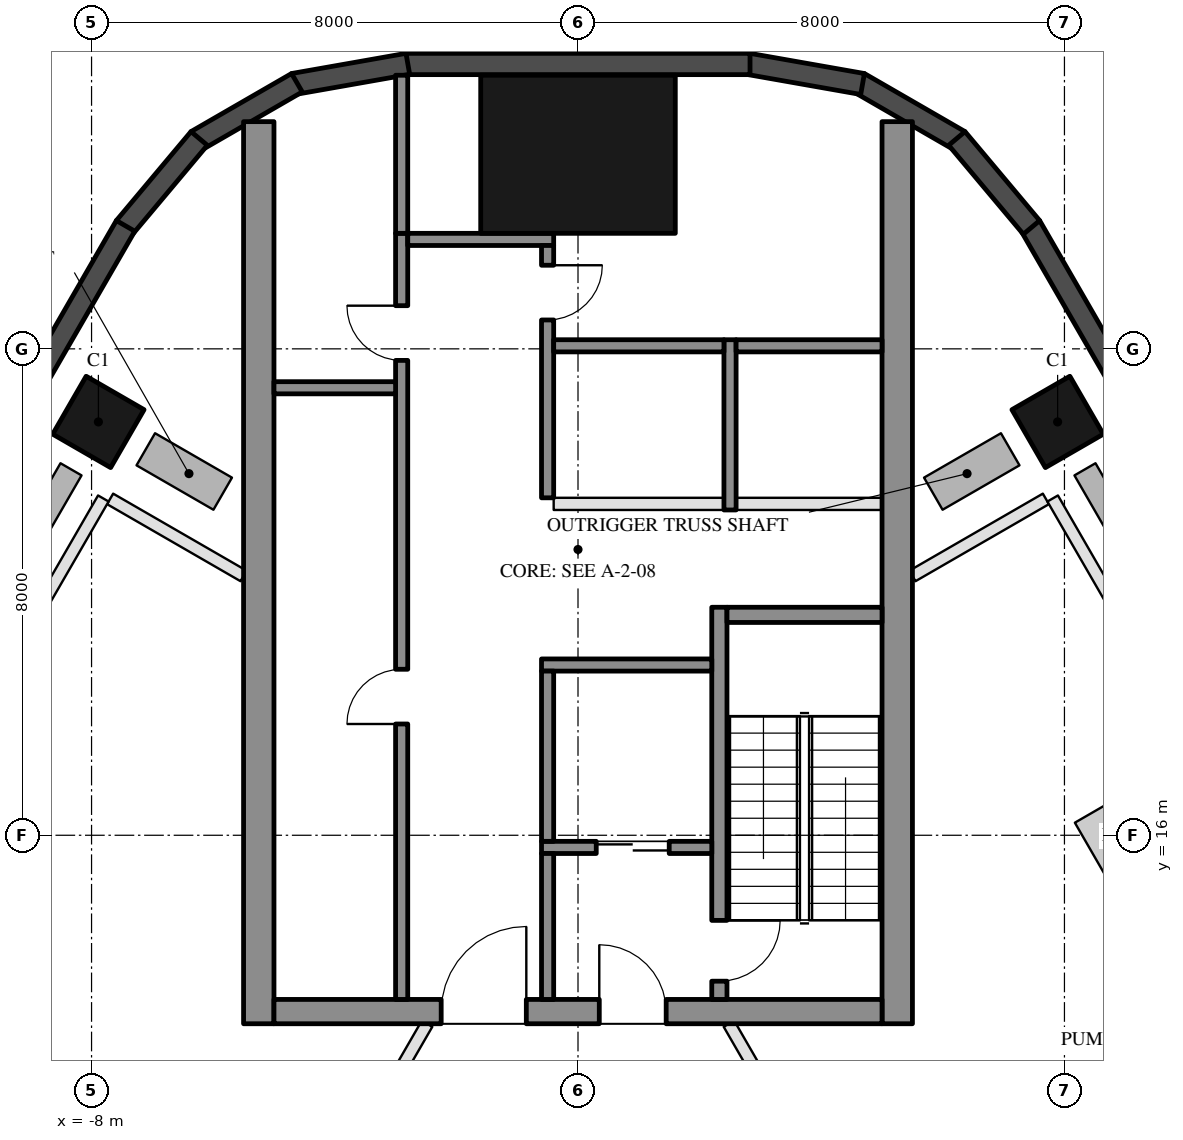
"""IFC4 building model, lengths in metres.
Left out: names, types, materials, properties, quantities, classifications, styles, units other than length and angle.
Written with IfcOpenShell. Run it as: python <this file> out.ifc"""

import sys

from ifc_helpers import new_model, si_unit, direction, frame, frame_2d, origin, origin_2d, place, context, subcontext, project, spatial, rectangle, hollow_rectangle, extrude, element, fill, save


model = new_model("IFC4")
c1 = context("Model", 3, precision=1e-05, world=origin(), true_north=direction((0.0, 1.0)))
c2 = subcontext(c1, "Body", "Model", "MODEL_VIEW")
j1 = project(units=[si_unit("LENGTHUNIT", "METRE"), si_unit("PLANEANGLEUNIT", "RADIAN")], contexts=[c1])
p1 = place(None, origin())
s1 = spatial("IfcSite", under=j1, at=p1, CompositionType="ELEMENT")
p2 = place(p1, origin())
s2 = spatial("IfcBuilding", under=s1, at=p2, CompositionType="ELEMENT")
p3 = place(p2, frame((0.0, 0.0, 42.0)))
s3 = spatial("IfcBuildingStorey", under=s2, at=p3, CompositionType="ELEMENT", Elevation=42.0)
for number, where, z_axis, x_axis in (
    (1, (7.888, 22.798, 0.0), (0.0, 0.0, 1.0), (-0.5, 0.866, 0.0)),
    (2, (-7.888, 22.798, 0.0), (0.0, 0.0, 1.0), (0.5, 0.866, 0.0)),
):
    element("IfcColumn", number, at=place(p3, frame(where, z_axis=z_axis, x_axis=x_axis)), inside=s3, PredefinedType="COLUMN", context=c2, shape_type="SweptSolid", body=[
        extrude(hollow_rectangle(XDim=1.1, YDim=1.1, WallThickness=0.05, at=origin_2d()), origin(), (0.0, 0.0, 1.0), 4.5),
    ])
p4 = place(p3, frame((0.0, 27.2, 0.0), z_axis=(0.0, 0.0, 1.0), x_axis=(1.0, 0.0, 0.0)))
e3 = element("IfcColumn", 3, at=p4, inside=s3, PredefinedType="COLUMN", context=c2, shape_type="SweptSolid", body=[
    extrude(hollow_rectangle(XDim=3.2, YDim=2.6, WallThickness=0.08, at=origin_2d()), origin(), (0.0, 0.0, 1.0), 4.5),
])
for number, where, z_axis, x_axis in (
    (4, (6.277, 27.422, 0.0), (0.0, 0.0, 1.0), (-0.866, 0.5, 0.0)),
    (5, (4.68, 28.356, 0.0), (0.0, 0.0, 1.0), (-0.985, 0.174, 0.0)),
):
    element("IfcWall", number, at=place(p3, frame(where, z_axis=z_axis, x_axis=x_axis)), inside=s3, PredefinedType="SOLIDWALL", context=c2, shape_type="SweptSolid", body=[
        extrude(rectangle(XDim=1.91, YDim=0.35, at=frame_2d((0.955, 0.0))), origin(), (0.0, 0.0, 1.0), 4.35),
    ])
p5 = place(p3, frame((2.829, 28.685, 0.0), z_axis=(0.0, 0.0, 1.0), x_axis=(-1.0, 0.0, 0.0)))
e6 = element("IfcWall", 6, at=p5, inside=s3, PredefinedType="SOLIDWALL", context=c2, shape_type="SweptSolid", body=[
    extrude(rectangle(XDim=5.658, YDim=0.35, at=frame_2d((2.829, 0.0))), origin(), (0.0, 0.0, 1.0), 4.35),
])
for number, where, z_axis, x_axis in (
    (7, (-2.799, 28.688, 0.0), (0.0, 0.0, 1.0), (-0.985, -0.174, 0.0)),
    (8, (-4.623, 28.377, 0.0), (0.0, 0.0, 1.0), (-0.866, -0.5, 0.0)),
):
    element("IfcWall", number, at=place(p3, frame(where, z_axis=z_axis, x_axis=x_axis)), inside=s3, PredefinedType="SOLIDWALL", context=c2, shape_type="SweptSolid", body=[
        extrude(rectangle(XDim=1.91, YDim=0.35, at=frame_2d((0.955, 0.0))), origin(), (0.0, 0.0, 1.0), 4.35),
    ])
p6 = place(p3, frame((-6.23, 27.461, 0.0), z_axis=(0.0, 0.0, 1.0), x_axis=(-0.642808304945, -0.766027077259, 0.0)))
e9 = element("IfcWall", 9, at=p6, inside=s3, PredefinedType="SOLIDWALL", context=c2, shape_type="SweptSolid", body=[
    extrude(rectangle(XDim=1.91, YDim=0.35, at=frame_2d((0.955, 0.0))), origin(), (0.0, 0.0, 1.0), 4.35),
])
for number, where, z_axis, x_axis in (
    (10, (-7.441, 26.022, 0.0), (0.0, 0.0, 1.0), (-0.5, -0.866, 0.0)),
    (11, (26.256, -6.567, 0.0), (0.0, 0.0, 1.0), (-0.5, 0.866, 0.0)),
):
    element("IfcWall", number, at=place(p3, frame(where, z_axis=z_axis, x_axis=x_axis)), inside=s3, PredefinedType="SOLIDWALL", context=c2, shape_type="SweptSolid", body=[
        extrude(rectangle(XDim=37.631, YDim=0.35, at=frame_2d((18.816, 0.0))), origin(), (0.0, 0.0, 1.0), 4.35),
    ])
p7 = place(p3, frame((7.458, 25.998, 0.0), z_axis=(0.0, 0.0, 1.0), x_axis=(-0.642808304945, 0.766027077259, 0.0)))
e12 = element("IfcWall", 12, at=p7, inside=s3, PredefinedType="SOLIDWALL", context=c2, shape_type="SweptSolid", body=[
    extrude(rectangle(XDim=1.91, YDim=0.35, at=frame_2d((0.955, 0.0))), origin(), (0.0, 0.0, 1.0), 4.35),
])
for number, where, z_axis, x_axis in (
    (13, (5.25, 12.9, 0.0), (0.0, 0.0, 1.0), (0.0, 1.0, 0.0)),
    (14, (-5.25, 12.9, 0.0), (0.0, 0.0, 1.0), (0.0, 1.0, 0.0)),
):
    element("IfcWall", number, at=place(p3, frame(where, z_axis=z_axis, x_axis=x_axis)), inside=s3, PredefinedType="SHEAR", context=c2, shape_type="SweptSolid", body=[
        extrude(rectangle(XDim=14.837, YDim=0.5, at=frame_2d((7.418, 0.0))), origin(), (0.0, 0.0, 1.0), 4.3),
    ])
p8 = place(p3, frame((5.0, 13.1, 0.0), z_axis=(0.0, 0.0, 1.0), x_axis=(-1.0, 0.0, 0.0)))
e15 = element("IfcWall", 15, at=p8, inside=s3, PredefinedType="SHEAR", context=c2, shape_type="SweptSolid", body=[
    extrude(rectangle(XDim=10.0, YDim=0.4, at=frame_2d((5.0, 0.0))), origin(), (0.0, 0.0, 1.0), 4.3),
])
p9 = place(p8, frame((3.55, 0.0, 0.0)))
e16 = element("IfcOpeningElement", 16, at=p9, cuts=e15, PredefinedType="OPENING", context=c2, shape_type="SweptSolid", body=[
    extrude(rectangle(XDim=1.1, YDim=2.1, at=frame_2d((0.55, 1.05))), frame((0.0, 0.21, 0.0), z_axis=(0.0, -1.0, 0.0), x_axis=(1.0, 0.0, 0.0)), (0.0, 0.0, 1.0), 0.42),
])
p10 = place(p8, frame((5.85, 0.0, 0.0)))
e17 = element("IfcOpeningElement", 17, at=p10, cuts=e15, PredefinedType="OPENING", context=c2, shape_type="SweptSolid", body=[
    extrude(rectangle(XDim=1.4, YDim=2.1, at=frame_2d((0.7, 1.05))), frame((0.0, 0.21, 0.0), z_axis=(0.0, -1.0, 0.0), x_axis=(1.0, 0.0, 0.0)), (0.0, 0.0, 1.0), 0.42),
])
p11 = place(p3, frame((2.325, 13.3, 0.0), z_axis=(0.0, 0.0, 1.0), x_axis=(0.0, 1.0, 0.0)))
e18 = element("IfcWall", 18, at=p11, inside=s3, PredefinedType="SHEAR", context=c2, shape_type="SweptSolid", body=[
    extrude(rectangle(XDim=6.45, YDim=0.25, at=frame_2d((3.225, 0.0))), origin(), (0.0, 0.0, 1.0), 4.3),
])
p12 = place(p11, frame((0.3, 0.0, 0.0)))
e19 = element("IfcOpeningElement", 19, at=p12, cuts=e18, PredefinedType="OPENING", context=c2, shape_type="SweptSolid", body=[
    extrude(rectangle(XDim=1.0, YDim=2.1, at=frame_2d((0.5, 1.05))), frame((0.0, 0.135, 0.0), z_axis=(0.0, -1.0, 0.0), x_axis=(1.0, 0.0, 0.0)), (0.0, 0.0, 1.0), 0.27),
])
p13 = place(p3, frame((5.0, 19.625, 0.0), z_axis=(0.0, 0.0, 1.0), x_axis=(-1.0, 0.0, 0.0)))
e20 = element("IfcWall", 20, at=p13, inside=s3, PredefinedType="SHEAR", context=c2, shape_type="SweptSolid", body=[
    extrude(rectangle(XDim=2.55, YDim=0.25, at=frame_2d((1.275, 0.0))), origin(), (0.0, 0.0, 1.0), 4.3),
])
p14 = place(p3, frame((2.2, 18.8, 0.0), z_axis=(0.0, 0.0, 1.0), x_axis=(-1.0, 0.0, 0.0)))
e21 = element("IfcWall", 21, at=p14, inside=s3, PredefinedType="SHEAR", context=c2, shape_type="SweptSolid", body=[
    extrude(rectangle(XDim=2.8, YDim=0.2, at=frame_2d((1.4, 0.0))), origin(), (0.0, 0.0, 1.0), 4.3),
])
p15 = place(p3, frame((2.2, 15.8, 0.0), z_axis=(0.0, 0.0, 1.0), x_axis=(-1.0, 0.0, 0.0)))
e22 = element("IfcWall", 22, at=p15, inside=s3, PredefinedType="SHEAR", context=c2, shape_type="SweptSolid", body=[
    extrude(rectangle(XDim=2.8, YDim=0.2, at=frame_2d((1.4, 0.0))), origin(), (0.0, 0.0, 1.0), 4.3),
])
p16 = place(p15, frame((0.7, 0.0, 0.0)))
e23 = element("IfcOpeningElement", 23, at=p16, cuts=e22, PredefinedType="OPENING", context=c2, shape_type="SweptSolid", body=[
    extrude(rectangle(XDim=1.2, YDim=2.1, at=frame_2d((0.6, 1.05))), frame((0.0, 0.11, 0.0), z_axis=(0.0, -1.0, 0.0), x_axis=(1.0, 0.0, 0.0)), (0.0, 0.0, 1.0), 0.22),
])
p17 = place(p3, frame((-0.5, 15.9, 0.0), z_axis=(0.0, 0.0, 1.0), x_axis=(0.0, 1.0, 0.0)))
e24 = element("IfcWall", 24, at=p17, inside=s3, PredefinedType="SHEAR", context=c2, shape_type="SweptSolid", body=[
    extrude(rectangle(XDim=2.8, YDim=0.2, at=frame_2d((1.4, 0.0))), origin(), (0.0, 0.0, 1.0), 4.3),
])
p18 = place(p3, frame((-0.5, 13.3, 0.0), z_axis=(0.0, 0.0, 1.0), x_axis=(0.0, 1.0, 0.0)))
e25 = element("IfcWall", 25, at=p18, inside=s3, PredefinedType="SHEAR", context=c2, shape_type="SweptSolid", body=[
    extrude(rectangle(XDim=2.4, YDim=0.2, at=frame_2d((1.2, 0.0))), origin(), (0.0, 0.0, 1.0), 4.3),
])
p19 = place(p3, frame((-2.9, 13.3, 0.0), z_axis=(0.0, 0.0, 1.0), x_axis=(0.0, 1.0, 0.0)))
e26 = element("IfcWall", 26, at=p19, inside=s3, PredefinedType="SHEAR", context=c2, shape_type="SweptSolid", body=[
    extrude(rectangle(XDim=12.6, YDim=0.2, at=frame_2d((6.3, 0.0))), origin(), (0.0, 0.0, 1.0), 4.3),
])
p20 = place(p19, frame((4.53, 0.0, 0.0)))
e27 = element("IfcOpeningElement", 27, at=p20, cuts=e26, PredefinedType="OPENING", context=c2, shape_type="SweptSolid", body=[
    extrude(rectangle(XDim=0.9, YDim=2.1, at=frame_2d((0.45, 1.05))), frame((0.0, 0.11, 0.0), z_axis=(0.0, -1.0, 0.0), x_axis=(1.0, 0.0, 0.0)), (0.0, 0.0, 1.0), 0.22),
])
p21 = place(p19, frame((10.51, 0.0, 0.0)))
e28 = element("IfcOpeningElement", 28, at=p21, cuts=e26, PredefinedType="OPENING", context=c2, shape_type="SweptSolid", body=[
    extrude(rectangle(XDim=0.9, YDim=2.1, at=frame_2d((0.45, 1.05))), frame((0.0, 0.11, 0.0), z_axis=(0.0, -1.0, 0.0), x_axis=(1.0, 0.0, 0.0)), (0.0, 0.0, 1.0), 0.22),
])
p22 = place(p3, frame((-0.4, 25.8, 0.0), z_axis=(0.0, 0.0, 1.0), x_axis=(-1.0, 0.0, 0.0)))
e29 = element("IfcWall", 29, at=p22, inside=s3, PredefinedType="SHEAR", context=c2, shape_type="SweptSolid", body=[
    extrude(rectangle(XDim=2.4, YDim=0.2, at=frame_2d((1.2, 0.0))), origin(), (0.0, 0.0, 1.0), 4.3),
])
p23 = place(p3, frame((-0.5, 21.55, 0.0), z_axis=(0.0, 0.0, 1.0), x_axis=(0.0, 1.0, 0.0)))
e30 = element("IfcWall", 30, at=p23, inside=s3, PredefinedType="SHEAR", context=c2, shape_type="SweptSolid", body=[
    extrude(rectangle(XDim=4.15, YDim=0.2, at=frame_2d((2.075, 0.0))), origin(), (0.0, 0.0, 1.0), 4.3),
])
p24 = place(p23, frame((2.925, 0.0, 0.0)))
e31 = element("IfcOpeningElement", 31, at=p24, cuts=e30, PredefinedType="OPENING", context=c2, shape_type="SweptSolid", body=[
    extrude(rectangle(XDim=0.9, YDim=2.1, at=frame_2d((0.45, 1.05))), frame((0.0, 0.11, 0.0), z_axis=(0.0, -1.0, 0.0), x_axis=(1.0, 0.0, 0.0)), (0.0, 0.0, 1.0), 0.22),
])
p25 = place(p3, frame((-3.0, 23.36, 0.0), z_axis=(0.0, 0.0, 1.0), x_axis=(-1.0, 0.0, 0.0)))
e32 = element("IfcWall", 32, at=p25, inside=s3, PredefinedType="SHEAR", context=c2, shape_type="SweptSolid", body=[
    extrude(rectangle(XDim=2.0, YDim=0.2, at=frame_2d((1.0, 0.0))), origin(), (0.0, 0.0, 1.0), 4.3),
])
p26 = place(p3, frame((-2.9, 25.9, 0.0), z_axis=(0.0, 0.0, 1.0), x_axis=(0.0, 1.0, 0.0)))
e33 = element("IfcWall", 33, at=p26, inside=s3, PredefinedType="SHEAR", context=c2, shape_type="SweptSolid", body=[
    extrude(rectangle(XDim=2.6, YDim=0.2, at=frame_2d((1.3, 0.0))), origin(), (0.0, 0.0, 1.0), 4.3),
])
p27 = place(p3, frame((2.5, 21.35, 0.0), z_axis=(0.0, 0.0, 1.0), x_axis=(0.0, 1.0, 0.0)))
e34 = element("IfcWall", 34, at=p27, inside=s3, PredefinedType="SHEAR", context=c2, shape_type="SweptSolid", body=[
    extrude(rectangle(XDim=2.8, YDim=0.2, at=frame_2d((1.4, 0.0))), origin(), (0.0, 0.0, 1.0), 4.3),
])
p28 = place(p3, frame((5.0, 24.05, 0.0), z_axis=(0.0, 0.0, 1.0), x_axis=(-1.0, 0.0, 0.0)))
e35 = element("IfcWall", 35, at=p28, inside=s3, PredefinedType="SHEAR", context=c2, shape_type="SweptSolid", body=[
    extrude(rectangle(XDim=2.4, YDim=0.2, at=frame_2d((1.2, 0.0))), origin(), (0.0, 0.0, 1.0), 4.3),
])
p29 = place(p3, frame((2.4, 24.05, 0.0), z_axis=(0.0, 0.0, 1.0), x_axis=(-1.0, 0.0, 0.0)))
e36 = element("IfcWall", 36, at=p29, inside=s3, PredefinedType="SHEAR", context=c2, shape_type="SweptSolid", body=[
    extrude(rectangle(XDim=2.8, YDim=0.2, at=frame_2d((1.4, 0.0))), origin(), (0.0, 0.0, 1.0), 4.3),
])
p30 = place(p3, frame((5.0, 21.45, 0.0), z_axis=(0.0, 0.0, 1.0), x_axis=(-1.0, 0.0, 0.0)))
e37 = element("IfcWall", 37, at=p30, inside=s3, PredefinedType="PARTITIONING", context=c2, shape_type="SweptSolid", body=[
    extrude(rectangle(XDim=2.4, YDim=0.2, at=frame_2d((1.2, 0.0))), origin(), (0.0, 0.0, 1.0), 4.3),
])
p31 = place(p3, frame((2.4, 21.45, 0.0), z_axis=(0.0, 0.0, 1.0), x_axis=(-1.0, 0.0, 0.0)))
e38 = element("IfcWall", 38, at=p31, inside=s3, PredefinedType="PARTITIONING", context=c2, shape_type="SweptSolid", body=[
    extrude(rectangle(XDim=2.8, YDim=0.2, at=frame_2d((1.4, 0.0))), origin(), (0.0, 0.0, 1.0), 4.3),
])
p32 = place(p3, frame((7.695, 21.532, 0.0), z_axis=(0.0, 0.0, 1.0), x_axis=(-0.865999496279, -0.500044870432, 0.0)))
e39 = element("IfcWall", 39, at=p32, inside=s3, PredefinedType="PARTITIONING", context=c2, shape_type="SweptSolid", body=[
    extrude(rectangle(XDim=2.534, YDim=0.2, at=frame_2d((1.267, 0.0))), origin(), (0.0, 0.0, 1.0), 4.35),
])
p33 = place(p3, frame((22.556, -4.009, 0.0), z_axis=(0.0, 0.0, 1.0), x_axis=(-0.500002084189, 0.866024200474, 0.0)))
e40 = element("IfcWall", 40, at=p33, inside=s3, PredefinedType="PARTITIONING", context=c2, shape_type="SweptSolid", body=[
    extrude(rectangle(XDim=29.5, YDim=0.2, at=frame_2d((14.75, 0.0))), origin(), (0.0, 0.0, 1.0), 3.75),
])
p34 = place(p3, frame((12.413, -4.3, 0.0), z_axis=(0.0, 0.0, 1.0), x_axis=(-0.50000478328, 0.866022642139, 0.0)))
e41 = element("IfcWall", 41, at=p34, inside=s3, PredefinedType="PARTITIONING", context=c2, shape_type="SweptSolid", body=[
    extrude(rectangle(XDim=19.861, YDim=0.2, at=frame_2d((9.931, 0.0))), origin(), (0.0, 0.0, 1.0), 3.75),
])
p35 = place(p34, frame((2.621, 0.0, 0.0)))
e42 = element("IfcOpeningElement", 42, at=p35, cuts=e41, PredefinedType="OPENING", context=c2, shape_type="SweptSolid", body=[
    extrude(rectangle(XDim=1.2, YDim=2.1, at=frame_2d((0.6, 1.05))), frame((0.0, 0.11, 0.0), z_axis=(0.0, -1.0, 0.0), x_axis=(1.0, 0.0, 0.0)), (0.0, 0.0, 1.0), 0.22),
])
p36 = place(p34, frame((9.081, 0.0, 0.0)))
e43 = element("IfcOpeningElement", 43, at=p36, cuts=e41, PredefinedType="OPENING", context=c2, shape_type="SweptSolid", body=[
    extrude(rectangle(XDim=1.2, YDim=2.1, at=frame_2d((0.6, 1.05))), frame((0.0, 0.11, 0.0), z_axis=(0.0, -1.0, 0.0), x_axis=(1.0, 0.0, 0.0)), (0.0, 0.0, 1.0), 0.22),
])
p37 = place(p34, frame((15.79, 0.0, 0.0)))
e44 = element("IfcOpeningElement", 44, at=p37, cuts=e41, PredefinedType="OPENING", context=c2, shape_type="SweptSolid", body=[
    extrude(rectangle(XDim=1.2, YDim=2.1, at=frame_2d((0.6, 1.05))), frame((0.0, 0.11, 0.0), z_axis=(0.0, -1.0, 0.0), x_axis=(1.0, 0.0, 0.0)), (0.0, 0.0, 1.0), 0.22),
])
p38 = place(p3, frame((-7.695, 21.532, 0.0), z_axis=(0.0, 0.0, 1.0), x_axis=(0.865999496279, -0.500044870432, 0.0)))
e45 = element("IfcWall", 45, at=p38, inside=s3, PredefinedType="PARTITIONING", context=c2, shape_type="SweptSolid", body=[
    extrude(rectangle(XDim=2.534, YDim=0.2, at=frame_2d((1.267, 0.0))), origin(), (0.0, 0.0, 1.0), 4.35),
])
p39 = place(p3, frame((-7.806, 21.539, 0.0), z_axis=(0.0, 0.0, 1.0), x_axis=(-0.500002084189, -0.866024200474, 0.0)))
e46 = element("IfcWall", 46, at=p39, inside=s3, PredefinedType="PARTITIONING", context=c2, shape_type="SweptSolid", body=[
    extrude(rectangle(XDim=29.5, YDim=0.2, at=frame_2d((14.75, 0.0))), origin(), (0.0, 0.0, 1.0), 3.75),
])
p40 = place(p3, frame((-2.482, 12.9, 0.0), z_axis=(0.0, 0.0, 1.0), x_axis=(-0.50000478328, -0.866022642139, 0.0)))
e47 = element("IfcWall", 47, at=p40, inside=s3, PredefinedType="PARTITIONING", context=c2, shape_type="SweptSolid", body=[
    extrude(rectangle(XDim=19.861, YDim=0.2, at=frame_2d((9.931, 0.0))), origin(), (0.0, 0.0, 1.0), 3.75),
])
p41 = place(p40, frame((1.885, 0.0, 0.0)))
e48 = element("IfcOpeningElement", 48, at=p41, cuts=e47, PredefinedType="OPENING", context=c2, shape_type="SweptSolid", body=[
    extrude(rectangle(XDim=1.2, YDim=2.1, at=frame_2d((0.6, 1.05))), frame((0.0, 0.11, 0.0), z_axis=(0.0, -1.0, 0.0), x_axis=(1.0, 0.0, 0.0)), (0.0, 0.0, 1.0), 0.22),
])
p42 = place(p40, frame((6.857, 0.0, 0.0)))
e49 = element("IfcOpeningElement", 49, at=p42, cuts=e47, PredefinedType="OPENING", context=c2, shape_type="SweptSolid", body=[
    extrude(rectangle(XDim=1.2, YDim=2.1, at=frame_2d((0.6, 1.05))), frame((0.0, 0.11, 0.0), z_axis=(0.0, -1.0, 0.0), x_axis=(1.0, 0.0, 0.0)), (0.0, 0.0, 1.0), 0.22),
])
p43 = place(p40, frame((11.804, 0.0, 0.0)))
e50 = element("IfcOpeningElement", 50, at=p43, cuts=e47, PredefinedType="OPENING", context=c2, shape_type="SweptSolid", body=[
    extrude(rectangle(XDim=1.2, YDim=2.1, at=frame_2d((0.6, 1.05))), frame((0.0, 0.11, 0.0), z_axis=(0.0, -1.0, 0.0), x_axis=(1.0, 0.0, 0.0)), (0.0, 0.0, 1.0), 0.22),
])
p44 = place(p40, frame((16.776, 0.0, 0.0)))
e51 = element("IfcOpeningElement", 51, at=p44, cuts=e47, PredefinedType="OPENING", context=c2, shape_type="SweptSolid", body=[
    extrude(rectangle(XDim=1.2, YDim=2.1, at=frame_2d((0.6, 1.05))), frame((0.0, 0.11, 0.0), z_axis=(0.0, -1.0, 0.0), x_axis=(1.0, 0.0, 0.0)), (0.0, 0.0, 1.0), 0.22),
])
p45 = place(p16, origin())
e52 = element("IfcDoor", 52, at=p45, inside=s3, OperationType="DOUBLE_DOOR_SLIDING", PredefinedType="DOOR", context=c2, shape_type="SweptSolid", body=[
    extrude(rectangle(XDim=1.2, YDim=2.1, at=frame_2d((0.6, 1.05))), frame((0.0, 0.025, 0.0), z_axis=(0.0, -1.0, 0.0), x_axis=(1.0, 0.0, 0.0)), (0.0, 0.0, 1.0), 0.05),
])
fill(e23, e52)
p46 = place(p20, origin())
e53 = element("IfcDoor", 53, at=p46, inside=s3, OperationType="SINGLE_SWING_LEFT", PredefinedType="DOOR", context=c2, shape_type="SweptSolid", body=[
    extrude(rectangle(XDim=0.9, YDim=2.1, at=frame_2d((0.45, 1.05))), frame((0.0, 0.025, 0.0), z_axis=(0.0, -1.0, 0.0), x_axis=(1.0, 0.0, 0.0)), (0.0, 0.0, 1.0), 0.05),
])
fill(e27, e53)
p47 = place(p21, origin())
e54 = element("IfcDoor", 54, at=p47, inside=s3, OperationType="SINGLE_SWING_RIGHT", PredefinedType="DOOR", context=c2, shape_type="SweptSolid", body=[
    extrude(rectangle(XDim=0.9, YDim=2.1, at=frame_2d((0.45, 1.05))), frame((0.0, 0.025, 0.0), z_axis=(0.0, -1.0, 0.0), x_axis=(1.0, 0.0, 0.0)), (0.0, 0.0, 1.0), 0.05),
])
fill(e28, e54)
p48 = place(p24, frame((0.9, 0.0, 0.0), z_axis=(0.0, 0.0, 1.0), x_axis=(-1.0, 0.0, 0.0)))
e55 = element("IfcDoor", 55, at=p48, inside=s3, OperationType="SINGLE_SWING_LEFT", PredefinedType="DOOR", context=c2, shape_type="SweptSolid", body=[
    extrude(rectangle(XDim=0.9, YDim=2.1, at=frame_2d((0.45, 1.05))), frame((0.0, 0.025, 0.0), z_axis=(0.0, -1.0, 0.0), x_axis=(1.0, 0.0, 0.0)), (0.0, 0.0, 1.0), 0.05),
])
fill(e31, e55)
p49 = place(p9, frame((1.1, 0.0, 0.0), z_axis=(0.0, 0.0, 1.0), x_axis=(-1.0, 0.0, 0.0)))
e56 = element("IfcDoor", 56, at=p49, inside=s3, OperationType="SINGLE_SWING_LEFT", PredefinedType="DOOR", context=c2, shape_type="SweptSolid", body=[
    extrude(rectangle(XDim=1.1, YDim=2.1, at=frame_2d((0.55, 1.05))), frame((0.0, 0.025, 0.0), z_axis=(0.0, -1.0, 0.0), x_axis=(1.0, 0.0, 0.0)), (0.0, 0.0, 1.0), 0.05),
])
fill(e16, e56)
p50 = place(p10, frame((1.4, 0.0, 0.0), z_axis=(0.0, 0.0, 1.0), x_axis=(-1.0, 0.0, 0.0)))
e57 = element("IfcDoor", 57, at=p50, inside=s3, OperationType="DOUBLE_DOOR_SINGLE_SWING", PredefinedType="DOOR", context=c2, shape_type="SweptSolid", body=[
    extrude(rectangle(XDim=1.4, YDim=2.1, at=frame_2d((0.7, 1.05))), frame((0.0, 0.025, 0.0), z_axis=(0.0, -1.0, 0.0), x_axis=(1.0, 0.0, 0.0)), (0.0, 0.0, 1.0), 0.05),
])
fill(e17, e57)
p51 = place(p12, frame((1.0, 0.0, 0.0), z_axis=(0.0, 0.0, 1.0), x_axis=(-1.0, 0.0, 0.0)))
e58 = element("IfcDoor", 58, at=p51, inside=s3, OperationType="SINGLE_SWING_LEFT", PredefinedType="DOOR", context=c2, shape_type="SweptSolid", body=[
    extrude(rectangle(XDim=1.0, YDim=2.1, at=frame_2d((0.5, 1.05))), frame((0.0, 0.025, 0.0), z_axis=(0.0, -1.0, 0.0), x_axis=(1.0, 0.0, 0.0)), (0.0, 0.0, 1.0), 0.05),
])
fill(e19, e58)
save(model, sys.argv[1])
